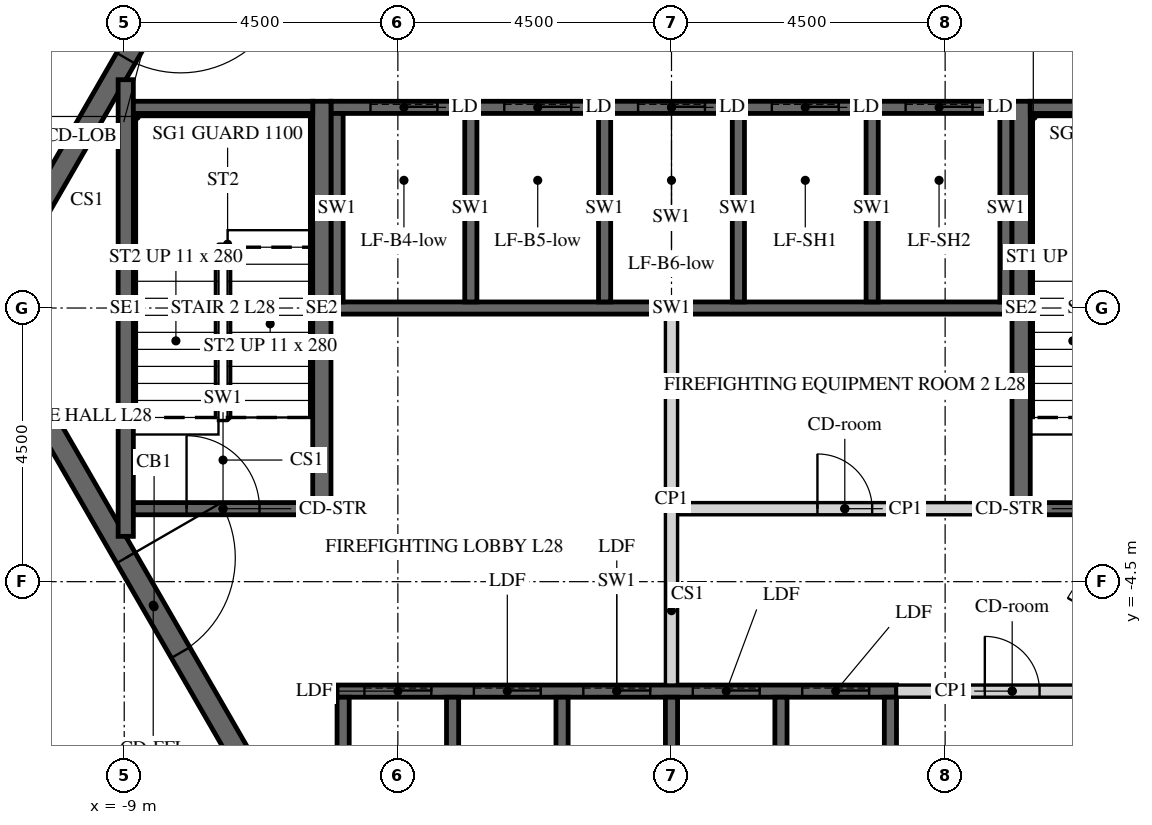
"""IFC4 building model, lengths in metres.
Left out: names, types, materials, properties, quantities, classifications, styles, units other than length and angle.
Written with IfcOpenShell. Run it as: python <this file> out.ifc"""

import sys

from ifc_helpers import new_model, si_unit, direction, frame, frame_2d, origin, place, context, subcontext, project, spatial, polyline, rectangle, outline, extrude, element, fill, save


model = new_model("IFC4")
c1 = context("Model", 3, precision=1e-05, world=origin(), true_north=direction((0.0, 1.0)))
c2 = subcontext(c1, "Body", "Model", "MODEL_VIEW")
j1 = project(units=[si_unit("LENGTHUNIT", "METRE"), si_unit("PLANEANGLEUNIT", "RADIAN")], contexts=[c1])
p1 = place(None, origin())
s1 = spatial("IfcSite", under=j1, at=p1, CompositionType="ELEMENT")
p2 = place(p1, origin())
s2 = spatial("IfcBuilding", under=s1, at=p2, CompositionType="ELEMENT")
p3 = place(p2, frame((0.0, 0.0, 123.3)))
s3 = spatial("IfcBuildingStorey", under=s2, at=p3, CompositionType="ELEMENT", Elevation=123.3)
p4 = place(p3, frame((-7.91, 13.7, -0.15), z_axis=(0.0, 0.0, 1.0), x_axis=(-0.499999880136, -0.866025472988, 0.0)))
e1 = element("IfcWall", 1, at=p4, inside=s3, PredefinedType="SHEAR", context=c2, shape_type="SweptSolid", body=[
    extrude(outline(polyline([(-0.173, -0.3), (15.993, -0.3), (15.646, 0.3), (0.173, 0.3), (-0.173, -0.3)])), origin(), (0.0, 0.0, 1.0), 3.9),
])
p5 = place(p4, frame((7.039, 0.0, 0.15)))
e2 = element("IfcOpeningElement", 2, at=p5, cuts=e1, PredefinedType="OPENING", context=c2, shape_type="SweptSolid", body=[
    extrude(rectangle(XDim=1.8, YDim=2.4, at=frame_2d((0.9, 1.2))), frame((0.0, 0.31, 0.0), z_axis=(0.0, -1.0, 0.0), x_axis=(1.0, 0.0, 0.0)), (0.0, 0.0, 1.0), 0.62),
])
p6 = place(p3, frame((-15.819, 0.0, -0.15), z_axis=(0.0, 0.0, 1.0), x_axis=(0.499999880136, -0.866025472988, 0.0)))
e3 = element("IfcWall", 3, at=p6, inside=s3, PredefinedType="SHEAR", context=c2, shape_type="SweptSolid", body=[
    extrude(outline(polyline([(-0.173, -0.3), (15.993, -0.3), (15.646, 0.3), (0.173, 0.3), (-0.173, -0.3)])), origin(), (0.0, 0.0, 1.0), 3.9),
])
p7 = place(p6, frame((6.981, 0.0, 0.15)))
e4 = element("IfcOpeningElement", 4, at=p7, cuts=e3, PredefinedType="OPENING", context=c2, shape_type="SweptSolid", body=[
    extrude(rectangle(XDim=1.8, YDim=2.4, at=frame_2d((0.9, 1.2))), frame((0.0, 0.31, 0.0), z_axis=(0.0, -1.0, 0.0), x_axis=(1.0, 0.0, 0.0)), (0.0, 0.0, 1.0), 0.62),
])
p8 = place(p3, frame((-5.673, 9.825, -0.15), z_axis=(0.0, 0.0, 1.0), x_axis=(-0.499995046907, -0.866028263435, 0.0)))
e5 = element("IfcWall", 5, at=p8, inside=s3, PredefinedType="SHEAR", context=c2, shape_type="SweptSolid", body=[
    extrude(outline(polyline([(-0.101, -0.175), (11.446, -0.175), (11.244, 0.175), (0.101, 0.175), (-0.101, -0.175)])), origin(), (0.0, 0.0, 1.0), 3.9),
])
p9 = place(p8, frame((4.801, 0.0, 0.15)))
e6 = element("IfcOpeningElement", 6, at=p9, cuts=e5, PredefinedType="OPENING", context=c2, shape_type="SweptSolid", body=[
    extrude(rectangle(XDim=1.8, YDim=2.4, at=frame_2d((0.9, 1.2))), frame((0.0, 0.185, 0.0), z_axis=(0.0, -1.0, 0.0), x_axis=(1.0, 0.0, 0.0)), (0.0, 0.0, 1.0), 0.37),
])
p10 = place(p3, frame((-11.345, 0.0, -0.15), z_axis=(0.0, 0.0, 1.0), x_axis=(0.499995046907, -0.866028263435, 0.0)))
e7 = element("IfcWall", 7, at=p10, inside=s3, PredefinedType="SHEAR", context=c2, shape_type="SweptSolid", body=[
    extrude(outline(polyline([(-0.101, -0.175), (11.446, -0.175), (11.244, 0.175), (0.101, 0.175), (-0.101, -0.175)])), origin(), (0.0, 0.0, 1.0), 3.9),
])
p11 = place(p10, frame((4.744, 0.0, 0.15)))
e8 = element("IfcOpeningElement", 8, at=p11, cuts=e7, PredefinedType="OPENING", context=c2, shape_type="SweptSolid", body=[
    extrude(rectangle(XDim=1.8, YDim=2.4, at=frame_2d((0.9, 1.2))), frame((0.0, 0.185, 0.0), z_axis=(0.0, -1.0, 0.0), x_axis=(1.0, 0.0, 0.0)), (0.0, 0.0, 1.0), 0.37),
])
p12 = place(p3, frame((5.673, -9.825, -0.15), z_axis=(0.0, 0.0, 1.0), x_axis=(0.499995046907, 0.866028263435, 0.0)))
e9 = element("IfcWall", 9, at=p12, inside=s3, PredefinedType="SHEAR", context=c2, shape_type="SweptSolid", body=[
    extrude(outline(polyline([(-0.101, -0.175), (11.446, -0.175), (11.244, 0.175), (0.101, 0.175), (-0.101, -0.175)])), origin(), (0.0, 0.0, 1.0), 3.9),
])
p13 = place(p12, frame((4.801, 0.0, 0.15)))
e10 = element("IfcOpeningElement", 10, at=p13, cuts=e9, PredefinedType="OPENING", context=c2, shape_type="SweptSolid", body=[
    extrude(rectangle(XDim=1.8, YDim=2.4, at=frame_2d((0.9, 1.2))), frame((0.0, 0.185, 0.0), z_axis=(0.0, -1.0, 0.0), x_axis=(1.0, 0.0, 0.0)), (0.0, 0.0, 1.0), 0.37),
])
p14 = place(p3, frame((11.345, 0.0, -0.15), z_axis=(0.0, 0.0, 1.0), x_axis=(-0.499995046907, 0.866028263435, 0.0)))
e11 = element("IfcWall", 11, at=p14, inside=s3, PredefinedType="SHEAR", context=c2, shape_type="SweptSolid", body=[
    extrude(outline(polyline([(-0.101, -0.175), (11.446, -0.175), (11.244, 0.175), (0.101, 0.175), (-0.101, -0.175)])), origin(), (0.0, 0.0, 1.0), 3.9),
])
p15 = place(p14, frame((4.744, 0.0, 0.15)))
e12 = element("IfcOpeningElement", 12, at=p15, cuts=e11, PredefinedType="OPENING", context=c2, shape_type="SweptSolid", body=[
    extrude(rectangle(XDim=1.8, YDim=2.4, at=frame_2d((0.9, 1.2))), frame((0.0, 0.185, 0.0), z_axis=(0.0, -1.0, 0.0), x_axis=(1.0, 0.0, 0.0)), (0.0, 0.0, 1.0), 0.37),
])
p16 = place(p3, frame((-5.6, 3.3, -0.25), z_axis=(0.0, 0.0, 1.0), x_axis=(1.0, 0.0, 0.0)))
e13 = element("IfcWall", 13, at=p16, inside=s3, PredefinedType="SHEAR", context=c2, shape_type="SweptSolid", body=[
    extrude(rectangle(XDim=11.2, YDim=0.2, at=frame_2d((5.6, 0.0))), origin(), (0.0, 0.0, 1.0), 3.9),
])
p17 = place(p16, frame((0.65, 0.0, 0.25)))
e14 = element("IfcOpeningElement", 14, at=p17, cuts=e13, PredefinedType="OPENING", context=c2, shape_type="SweptSolid", body=[
    extrude(rectangle(XDim=1.1, YDim=2.1, at=frame_2d((0.55, 1.05))), frame((0.0, 0.11, 0.0), z_axis=(0.0, -1.0, 0.0), x_axis=(1.0, 0.0, 0.0)), (0.0, 0.0, 1.0), 0.22),
])
p18 = place(p16, frame((2.85, 0.0, 0.25)))
e15 = element("IfcOpeningElement", 15, at=p18, cuts=e13, PredefinedType="OPENING", context=c2, shape_type="SweptSolid", body=[
    extrude(rectangle(XDim=1.1, YDim=2.1, at=frame_2d((0.55, 1.05))), frame((0.0, 0.11, 0.0), z_axis=(0.0, -1.0, 0.0), x_axis=(1.0, 0.0, 0.0)), (0.0, 0.0, 1.0), 0.22),
])
p19 = place(p16, frame((5.05, 0.0, 0.25)))
e16 = element("IfcOpeningElement", 16, at=p19, cuts=e13, PredefinedType="OPENING", context=c2, shape_type="SweptSolid", body=[
    extrude(rectangle(XDim=1.1, YDim=2.1, at=frame_2d((0.55, 1.05))), frame((0.0, 0.11, 0.0), z_axis=(0.0, -1.0, 0.0), x_axis=(1.0, 0.0, 0.0)), (0.0, 0.0, 1.0), 0.22),
])
p20 = place(p16, frame((7.25, 0.0, 0.25)))
e17 = element("IfcOpeningElement", 17, at=p20, cuts=e13, PredefinedType="OPENING", context=c2, shape_type="SweptSolid", body=[
    extrude(rectangle(XDim=1.1, YDim=2.1, at=frame_2d((0.55, 1.05))), frame((0.0, 0.11, 0.0), z_axis=(0.0, -1.0, 0.0), x_axis=(1.0, 0.0, 0.0)), (0.0, 0.0, 1.0), 0.22),
])
p21 = place(p16, frame((9.45, 0.0, 0.25)))
e18 = element("IfcOpeningElement", 18, at=p21, cuts=e13, PredefinedType="OPENING", context=c2, shape_type="SweptSolid", body=[
    extrude(rectangle(XDim=1.1, YDim=2.1, at=frame_2d((0.55, 1.05))), frame((0.0, 0.11, 0.0), z_axis=(0.0, -1.0, 0.0), x_axis=(1.0, 0.0, 0.0)), (0.0, 0.0, 1.0), 0.22),
])
p22 = place(p3, frame((-5.6, 0.0, -0.25), z_axis=(0.0, 0.0, 1.0), x_axis=(1.0, 0.0, 0.0)))
e19 = element("IfcWall", 19, at=p22, inside=s3, PredefinedType="SHEAR", context=c2, shape_type="SweptSolid", body=[
    extrude(rectangle(XDim=11.2, YDim=0.2, at=frame_2d((5.6, 0.0))), origin(), (0.0, 0.0, 1.0), 3.9),
])
for number, where, z_axis, x_axis in (
    (20, (-5.5, 0.1, -0.25), (0.0, 0.0, 1.0), (0.0, 1.0, 0.0)),
    (21, (-3.3, 0.1, -0.25), (0.0, 0.0, 1.0), (0.0, 1.0, 0.0)),
    (22, (-1.1, 0.1, -0.25), (0.0, 0.0, 1.0), (0.0, 1.0, 0.0)),
    (23, (1.1, 0.1, -0.25), (0.0, 0.0, 1.0), (0.0, 1.0, 0.0)),
    (24, (3.3, 0.1, -0.25), (0.0, 0.0, 1.0), (0.0, 1.0, 0.0)),
    (25, (5.5, 0.1, -0.25), (0.0, 0.0, 1.0), (0.0, 1.0, 0.0)),
):
    element("IfcWall", number, at=place(p3, frame(where, z_axis=z_axis, x_axis=x_axis)), inside=s3, PredefinedType="SHEAR", context=c2, shape_type="SweptSolid", body=[
        extrude(rectangle(XDim=3.1, YDim=0.2, at=frame_2d((1.55, 0.0))), origin(), (0.0, 0.0, 1.0), 3.9),
    ])
p23 = place(p3, frame((-5.5, -6.3, -0.25), z_axis=(0.0, 0.0, 1.0), x_axis=(1.0, 0.0, 0.0)))
e26 = element("IfcWall", 26, at=p23, inside=s3, PredefinedType="SHEAR", context=c2, shape_type="SweptSolid", body=[
    extrude(rectangle(XDim=9.2, YDim=0.2, at=frame_2d((4.6, 0.0))), origin(), (0.0, 0.0, 1.0), 3.9),
])
p24 = place(p23, frame((0.45, 0.0, 0.25)))
e27 = element("IfcOpeningElement", 27, at=p24, cuts=e26, PredefinedType="OPENING", context=c2, shape_type="SweptSolid", body=[
    extrude(rectangle(XDim=1.1, YDim=2.1, at=frame_2d((0.55, 1.05))), frame((0.0, 0.11, 0.0), z_axis=(0.0, -1.0, 0.0), x_axis=(1.0, 0.0, 0.0)), (0.0, 0.0, 1.0), 0.22),
])
p25 = place(p23, frame((2.25, 0.0, 0.25)))
e28 = element("IfcOpeningElement", 28, at=p25, cuts=e26, PredefinedType="OPENING", context=c2, shape_type="SweptSolid", body=[
    extrude(rectangle(XDim=1.1, YDim=2.1, at=frame_2d((0.55, 1.05))), frame((0.0, 0.11, 0.0), z_axis=(0.0, -1.0, 0.0), x_axis=(1.0, 0.0, 0.0)), (0.0, 0.0, 1.0), 0.22),
])
p26 = place(p23, frame((4.05, 0.0, 0.25)))
e29 = element("IfcOpeningElement", 29, at=p26, cuts=e26, PredefinedType="OPENING", context=c2, shape_type="SweptSolid", body=[
    extrude(rectangle(XDim=1.1, YDim=2.1, at=frame_2d((0.55, 1.05))), frame((0.0, 0.11, 0.0), z_axis=(0.0, -1.0, 0.0), x_axis=(1.0, 0.0, 0.0)), (0.0, 0.0, 1.0), 0.22),
])
p27 = place(p23, frame((5.85, 0.0, 0.25)))
e30 = element("IfcOpeningElement", 30, at=p27, cuts=e26, PredefinedType="OPENING", context=c2, shape_type="SweptSolid", body=[
    extrude(rectangle(XDim=1.1, YDim=2.1, at=frame_2d((0.55, 1.05))), frame((0.0, 0.11, 0.0), z_axis=(0.0, -1.0, 0.0), x_axis=(1.0, 0.0, 0.0)), (0.0, 0.0, 1.0), 0.22),
])
p28 = place(p23, frame((7.65, 0.0, 0.25)))
e31 = element("IfcOpeningElement", 31, at=p28, cuts=e26, PredefinedType="OPENING", context=c2, shape_type="SweptSolid", body=[
    extrude(rectangle(XDim=1.1, YDim=2.1, at=frame_2d((0.55, 1.05))), frame((0.0, 0.11, 0.0), z_axis=(0.0, -1.0, 0.0), x_axis=(1.0, 0.0, 0.0)), (0.0, 0.0, 1.0), 0.22),
])
for number, where, z_axis, x_axis in (
    (32, (-5.4, -9.3, -0.25), (0.0, 0.0, 1.0), (0.0, 1.0, 0.0)),
    (33, (-3.6, -9.3, -0.25), (0.0, 0.0, 1.0), (0.0, 1.0, 0.0)),
    (34, (-1.8, -9.3, -0.25), (0.0, 0.0, 1.0), (0.0, 1.0, 0.0)),
    (35, (0.0, -9.3, -0.25), (0.0, 0.0, 1.0), (0.0, 1.0, 0.0)),
    (36, (1.8, -9.3, -0.25), (0.0, 0.0, 1.0), (0.0, 1.0, 0.0)),
    (37, (3.6, -9.3, -0.25), (0.0, 0.0, 1.0), (0.0, 1.0, 0.0)),
):
    element("IfcWall", number, at=place(p3, frame(where, z_axis=z_axis, x_axis=x_axis)), inside=s3, PredefinedType="SHEAR", context=c2, shape_type="SweptSolid", body=[
        extrude(rectangle(XDim=2.9, YDim=0.2, at=frame_2d((1.45, 0.0))), origin(), (0.0, 0.0, 1.0), 3.9),
    ])
p29 = place(p3, frame((0.1, -3.3, 0.0), z_axis=(0.0, 0.0, 1.0), x_axis=(1.0, 0.0, 0.0)))
e38 = element("IfcWall", 38, at=p29, inside=s3, PredefinedType="PARTITIONING", context=c2, shape_type="SweptSolid", body=[
    extrude(rectangle(XDim=5.5, YDim=0.2, at=frame_2d((2.75, 0.0))), origin(), (0.0, 0.0, 1.0), 3.65),
])
p30 = place(p29, frame((2.3, 0.0, 0.0)))
e39 = element("IfcOpeningElement", 39, at=p30, cuts=e38, PredefinedType="OPENING", context=c2, shape_type="SweptSolid", body=[
    extrude(rectangle(XDim=0.9, YDim=2.1, at=frame_2d((0.45, 1.05))), frame((0.0, 0.11, 0.0), z_axis=(0.0, -1.0, 0.0), x_axis=(1.0, 0.0, 0.0)), (0.0, 0.0, 1.0), 0.22),
])
p31 = place(p3, frame((0.0, -6.2, 0.0), z_axis=(0.0, 0.0, 1.0), x_axis=(0.0, 1.0, 0.0)))
e40 = element("IfcWall", 40, at=p31, inside=s3, PredefinedType="PARTITIONING", context=c2, shape_type="SweptSolid", body=[
    extrude(rectangle(XDim=6.1, YDim=0.2, at=frame_2d((3.05, 0.0))), origin(), (0.0, 0.0, 1.0), 3.65),
])
p32 = place(p3, frame((3.7, -6.3, 0.0), z_axis=(0.0, 0.0, 1.0), x_axis=(1.0, 0.0, 0.0)))
e41 = element("IfcWall", 41, at=p32, inside=s3, PredefinedType="PARTITIONING", context=c2, shape_type="SweptSolid", body=[
    extrude(rectangle(XDim=3.806, YDim=0.2, at=frame_2d((1.903, 0.0))), origin(), (0.0, 0.0, 1.0), 3.65),
])
p33 = place(p32, frame((1.453, 0.0, 0.0)))
e42 = element("IfcOpeningElement", 42, at=p33, cuts=e41, PredefinedType="OPENING", context=c2, shape_type="SweptSolid", body=[
    extrude(rectangle(XDim=0.9, YDim=2.1, at=frame_2d((0.45, 1.05))), frame((0.0, 0.11, 0.0), z_axis=(0.0, -1.0, 0.0), x_axis=(1.0, 0.0, 0.0)), (0.0, 0.0, 1.0), 0.22),
])
p34 = place(p3, frame((5.75, -3.4, -0.25), z_axis=(0.0, 0.0, 1.0), x_axis=(0.0, 1.0, 0.0)))
e43 = element("IfcWall", 43, at=p34, inside=s3, PredefinedType="SHEAR", context=c2, shape_type="SweptSolid", body=[
    extrude(rectangle(XDim=6.8, YDim=0.3, at=frame_2d((3.4, 0.0))), origin(), (0.0, 0.0, 1.0), 3.9),
])
p35 = place(p3, frame((5.9, 3.3, -0.25), z_axis=(0.0, 0.0, 1.0), x_axis=(1.0, 0.0, 0.0)))
e44 = element("IfcWall", 44, at=p35, inside=s3, PredefinedType="SHEAR", context=c2, shape_type="SweptSolid", body=[
    extrude(rectangle(XDim=2.95, YDim=0.2, at=frame_2d((1.475, 0.0))), origin(), (0.0, 0.0, 1.0), 3.9),
])
p36 = place(p3, frame((5.9, -3.3, -0.25), z_axis=(0.0, 0.0, 1.0), x_axis=(1.0, 0.0, 0.0)))
e45 = element("IfcWall", 45, at=p36, inside=s3, PredefinedType="SHEAR", context=c2, shape_type="SweptSolid", body=[
    extrude(rectangle(XDim=2.95, YDim=0.2, at=frame_2d((1.475, 0.0))), origin(), (0.0, 0.0, 1.0), 3.9),
])
p37 = place(p36, frame((0.875, 0.0, 0.25)))
e46 = element("IfcOpeningElement", 46, at=p37, cuts=e45, PredefinedType="OPENING", context=c2, shape_type="SweptSolid", body=[
    extrude(rectangle(XDim=1.2, YDim=2.4, at=frame_2d((0.6, 1.2))), frame((0.0, 0.11, 0.0), z_axis=(0.0, -1.0, 0.0), x_axis=(1.0, 0.0, 0.0)), (0.0, 0.0, 1.0), 0.22),
])
p38 = place(p3, frame((-5.75, -3.4, -0.25), z_axis=(0.0, 0.0, 1.0), x_axis=(0.0, 1.0, 0.0)))
e47 = element("IfcWall", 47, at=p38, inside=s3, PredefinedType="SHEAR", context=c2, shape_type="SweptSolid", body=[
    extrude(rectangle(XDim=6.8, YDim=0.3, at=frame_2d((3.4, 0.0))), origin(), (0.0, 0.0, 1.0), 3.9),
])
p39 = place(p3, frame((-8.975, -3.755, -0.25), z_axis=(0.0, 0.0, 1.0), x_axis=(0.0, 1.0, 0.0)))
e48 = element("IfcWall", 48, at=p39, inside=s3, PredefinedType="SHEAR", context=c2, shape_type="SweptSolid", body=[
    extrude(rectangle(XDim=7.51, YDim=0.25, at=frame_2d((3.755, 0.0))), origin(), (0.0, 0.0, 1.0), 3.9),
])
p40 = place(p3, frame((-8.85, 3.3, -0.25), z_axis=(0.0, 0.0, 1.0), x_axis=(1.0, 0.0, 0.0)))
e49 = element("IfcWall", 49, at=p40, inside=s3, PredefinedType="SHEAR", context=c2, shape_type="SweptSolid", body=[
    extrude(rectangle(XDim=2.95, YDim=0.2, at=frame_2d((1.475, 0.0))), origin(), (0.0, 0.0, 1.0), 3.9),
])
p41 = place(p3, frame((-8.85, -3.3, -0.25), z_axis=(0.0, 0.0, 1.0), x_axis=(1.0, 0.0, 0.0)))
e50 = element("IfcWall", 50, at=p41, inside=s3, PredefinedType="SHEAR", context=c2, shape_type="SweptSolid", body=[
    extrude(rectangle(XDim=2.95, YDim=0.2, at=frame_2d((1.475, 0.0))), origin(), (0.0, 0.0, 1.0), 3.9),
])
p42 = place(p41, frame((0.875, 0.0, 0.25)))
e51 = element("IfcOpeningElement", 51, at=p42, cuts=e50, PredefinedType="OPENING", context=c2, shape_type="SweptSolid", body=[
    extrude(rectangle(XDim=1.2, YDim=2.4, at=frame_2d((0.6, 1.2))), frame((0.0, 0.11, 0.0), z_axis=(0.0, -1.0, 0.0), x_axis=(1.0, 0.0, 0.0)), (0.0, 0.0, 1.0), 0.22),
])
p43 = place(p9, origin())
e52 = element("IfcDoor", 52, at=p43, inside=s3, OperationType="DOUBLE_DOOR_SINGLE_SWING", PredefinedType="DOOR", context=c2, shape_type="SweptSolid", body=[
    extrude(rectangle(XDim=1.8, YDim=2.4, at=frame_2d((0.9, 1.2))), frame((0.0, 0.025, 0.0), z_axis=(0.0, -1.0, 0.0), x_axis=(1.0, 0.0, 0.0)), (0.0, 0.0, 1.0), 0.05),
])
fill(e6, e52)
p44 = place(p11, origin())
e53 = element("IfcDoor", 53, at=p44, inside=s3, OperationType="DOUBLE_DOOR_SINGLE_SWING", PredefinedType="DOOR", context=c2, shape_type="SweptSolid", body=[
    extrude(rectangle(XDim=1.8, YDim=2.4, at=frame_2d((0.9, 1.2))), frame((0.0, 0.025, 0.0), z_axis=(0.0, -1.0, 0.0), x_axis=(1.0, 0.0, 0.0)), (0.0, 0.0, 1.0), 0.05),
])
fill(e8, e53)
p45 = place(p30, origin())
e54 = element("IfcDoor", 54, at=p45, inside=s3, OperationType="SINGLE_SWING_LEFT", PredefinedType="DOOR", context=c2, shape_type="SweptSolid", body=[
    extrude(rectangle(XDim=0.9, YDim=2.1, at=frame_2d((0.45, 1.05))), frame((0.0, 0.025, 0.0), z_axis=(0.0, -1.0, 0.0), x_axis=(1.0, 0.0, 0.0)), (0.0, 0.0, 1.0), 0.05),
])
fill(e39, e54)
p46 = place(p33, origin())
e55 = element("IfcDoor", 55, at=p46, inside=s3, OperationType="SINGLE_SWING_LEFT", PredefinedType="DOOR", context=c2, shape_type="SweptSolid", body=[
    extrude(rectangle(XDim=0.9, YDim=2.1, at=frame_2d((0.45, 1.05))), frame((0.0, 0.025, 0.0), z_axis=(0.0, -1.0, 0.0), x_axis=(1.0, 0.0, 0.0)), (0.0, 0.0, 1.0), 0.05),
])
fill(e42, e55)
p47 = place(p42, origin())
e56 = element("IfcDoor", 56, at=p47, inside=s3, OperationType="SINGLE_SWING_LEFT", PredefinedType="DOOR", context=c2, shape_type="SweptSolid", body=[
    extrude(rectangle(XDim=1.2, YDim=2.4, at=frame_2d((0.6, 1.2))), frame((0.0, 0.025, 0.0), z_axis=(0.0, -1.0, 0.0), x_axis=(1.0, 0.0, 0.0)), (0.0, 0.0, 1.0), 0.05),
])
fill(e51, e56)
p48 = place(p17, origin())
e57 = element("IfcDoor", 57, at=p48, inside=s3, OperationType="SLIDING_TO_LEFT", PredefinedType="DOOR", context=c2, shape_type="SweptSolid", body=[
    extrude(rectangle(XDim=1.1, YDim=2.1, at=frame_2d((0.55, 1.05))), frame((0.0, 0.025, 0.0), z_axis=(0.0, -1.0, 0.0), x_axis=(1.0, 0.0, 0.0)), (0.0, 0.0, 1.0), 0.05),
])
fill(e14, e57)
p49 = place(p18, origin())
e58 = element("IfcDoor", 58, at=p49, inside=s3, OperationType="SLIDING_TO_LEFT", PredefinedType="DOOR", context=c2, shape_type="SweptSolid", body=[
    extrude(rectangle(XDim=1.1, YDim=2.1, at=frame_2d((0.55, 1.05))), frame((0.0, 0.025, 0.0), z_axis=(0.0, -1.0, 0.0), x_axis=(1.0, 0.0, 0.0)), (0.0, 0.0, 1.0), 0.05),
])
fill(e15, e58)
p50 = place(p19, origin())
e59 = element("IfcDoor", 59, at=p50, inside=s3, OperationType="SLIDING_TO_LEFT", PredefinedType="DOOR", context=c2, shape_type="SweptSolid", body=[
    extrude(rectangle(XDim=1.1, YDim=2.1, at=frame_2d((0.55, 1.05))), frame((0.0, 0.025, 0.0), z_axis=(0.0, -1.0, 0.0), x_axis=(1.0, 0.0, 0.0)), (0.0, 0.0, 1.0), 0.05),
])
fill(e16, e59)
p51 = place(p20, origin())
e60 = element("IfcDoor", 60, at=p51, inside=s3, OperationType="SLIDING_TO_LEFT", PredefinedType="DOOR", context=c2, shape_type="SweptSolid", body=[
    extrude(rectangle(XDim=1.1, YDim=2.1, at=frame_2d((0.55, 1.05))), frame((0.0, 0.025, 0.0), z_axis=(0.0, -1.0, 0.0), x_axis=(1.0, 0.0, 0.0)), (0.0, 0.0, 1.0), 0.05),
])
fill(e17, e60)
p52 = place(p21, origin())
e61 = element("IfcDoor", 61, at=p52, inside=s3, OperationType="SLIDING_TO_LEFT", PredefinedType="DOOR", context=c2, shape_type="SweptSolid", body=[
    extrude(rectangle(XDim=1.1, YDim=2.1, at=frame_2d((0.55, 1.05))), frame((0.0, 0.025, 0.0), z_axis=(0.0, -1.0, 0.0), x_axis=(1.0, 0.0, 0.0)), (0.0, 0.0, 1.0), 0.05),
])
fill(e18, e61)
p53 = place(p24, origin())
e62 = element("IfcDoor", 62, at=p53, inside=s3, OperationType="SLIDING_TO_LEFT", PredefinedType="DOOR", context=c2, shape_type="SweptSolid", body=[
    extrude(rectangle(XDim=1.1, YDim=2.1, at=frame_2d((0.55, 1.05))), frame((0.0, 0.025, 0.0), z_axis=(0.0, -1.0, 0.0), x_axis=(1.0, 0.0, 0.0)), (0.0, 0.0, 1.0), 0.05),
])
fill(e27, e62)
p54 = place(p25, origin())
e63 = element("IfcDoor", 63, at=p54, inside=s3, OperationType="SLIDING_TO_LEFT", PredefinedType="DOOR", context=c2, shape_type="SweptSolid", body=[
    extrude(rectangle(XDim=1.1, YDim=2.1, at=frame_2d((0.55, 1.05))), frame((0.0, 0.025, 0.0), z_axis=(0.0, -1.0, 0.0), x_axis=(1.0, 0.0, 0.0)), (0.0, 0.0, 1.0), 0.05),
])
fill(e28, e63)
p55 = place(p26, origin())
e64 = element("IfcDoor", 64, at=p55, inside=s3, OperationType="SLIDING_TO_LEFT", PredefinedType="DOOR", context=c2, shape_type="SweptSolid", body=[
    extrude(rectangle(XDim=1.1, YDim=2.1, at=frame_2d((0.55, 1.05))), frame((0.0, 0.025, 0.0), z_axis=(0.0, -1.0, 0.0), x_axis=(1.0, 0.0, 0.0)), (0.0, 0.0, 1.0), 0.05),
])
fill(e29, e64)
p56 = place(p27, origin())
e65 = element("IfcDoor", 65, at=p56, inside=s3, OperationType="SLIDING_TO_LEFT", PredefinedType="DOOR", context=c2, shape_type="SweptSolid", body=[
    extrude(rectangle(XDim=1.1, YDim=2.1, at=frame_2d((0.55, 1.05))), frame((0.0, 0.025, 0.0), z_axis=(0.0, -1.0, 0.0), x_axis=(1.0, 0.0, 0.0)), (0.0, 0.0, 1.0), 0.05),
])
fill(e30, e65)
p57 = place(p28, origin())
e66 = element("IfcDoor", 66, at=p57, inside=s3, OperationType="SLIDING_TO_LEFT", PredefinedType="DOOR", context=c2, shape_type="SweptSolid", body=[
    extrude(rectangle(XDim=1.1, YDim=2.1, at=frame_2d((0.55, 1.05))), frame((0.0, 0.025, 0.0), z_axis=(0.0, -1.0, 0.0), x_axis=(1.0, 0.0, 0.0)), (0.0, 0.0, 1.0), 0.05),
])
fill(e31, e66)
save(model, sys.argv[1])
